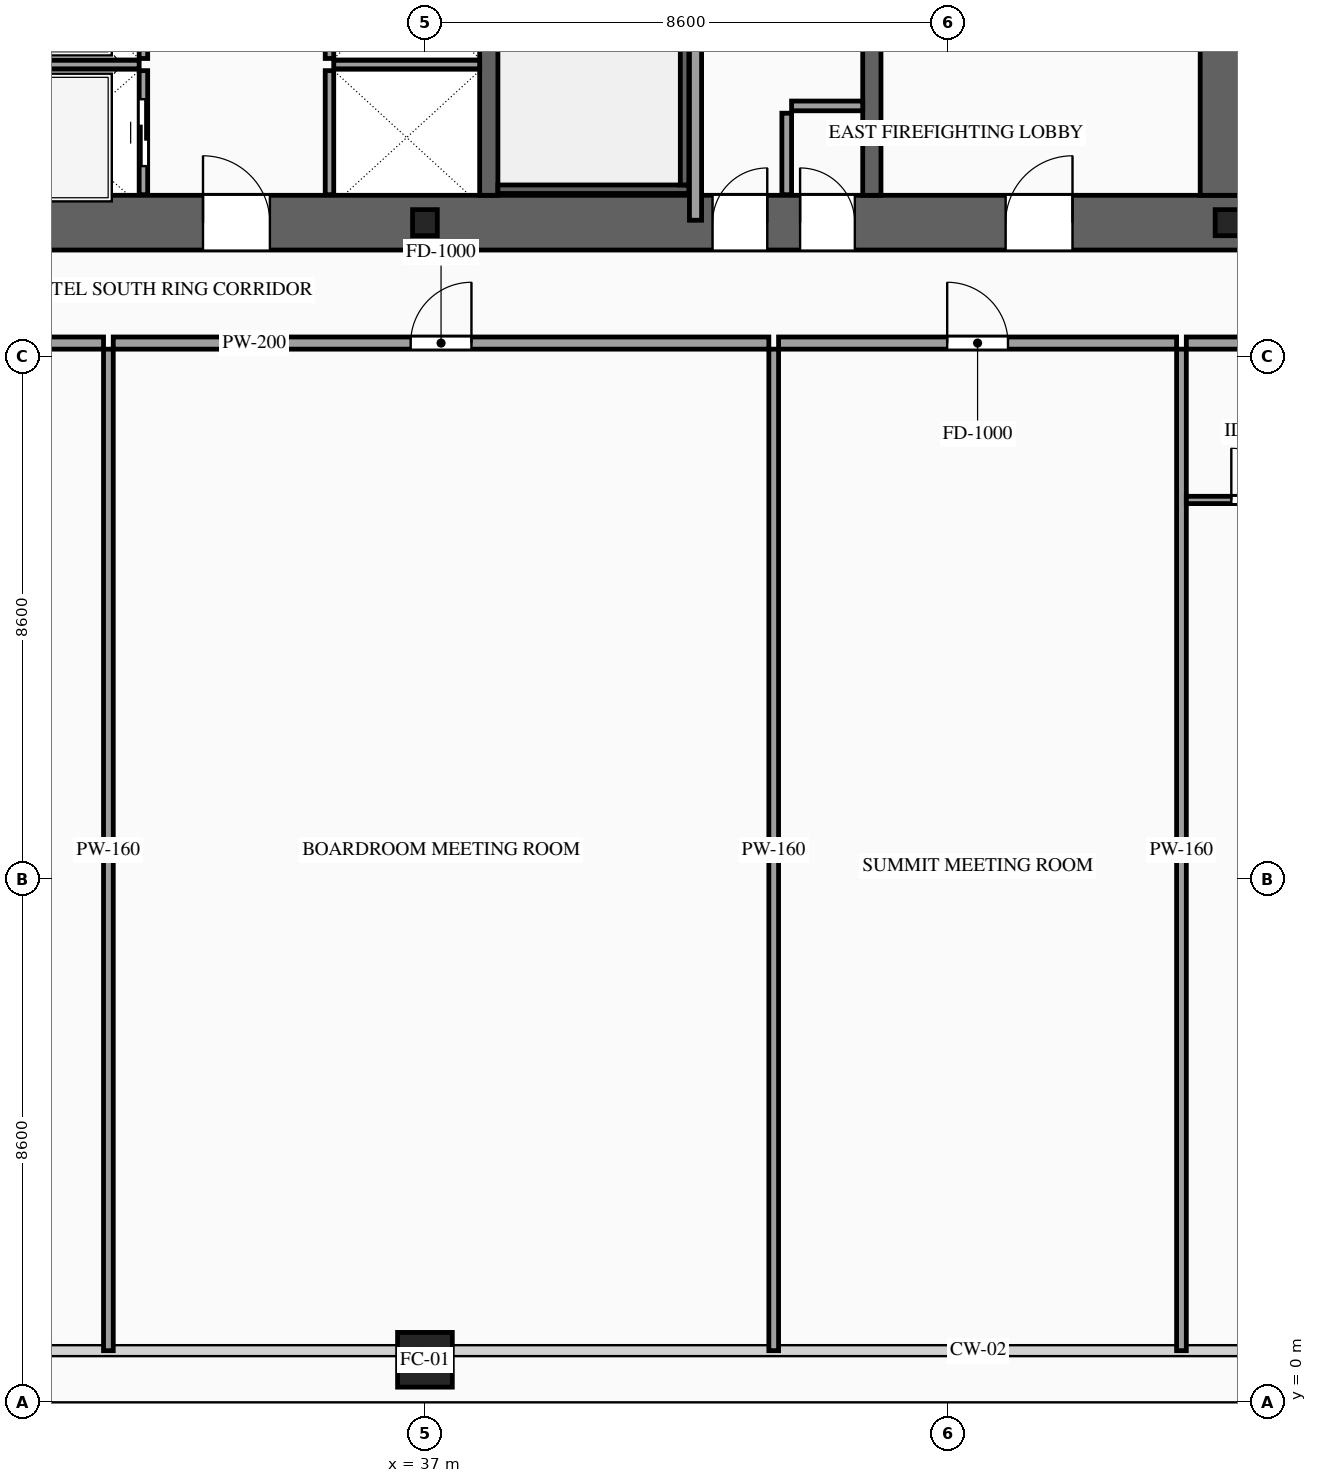
"""IFC4 building model, lengths in metres.
Left out: names, types, materials, properties, quantities, classifications, styles, units other than length and angle.
Written with IfcOpenShell. Run it as: python <this file> out.ifc"""

import sys

from ifc_helpers import new_model, si_unit, direction, frame, frame_2d, origin, origin_2d, place, context, subcontext, project, spatial, rectangle, hollow_rectangle, i_section, extrude, source, transform, mapped, element, fill, save


model = new_model("IFC4")
c1 = context("Model", 3, precision=1e-05, world=origin(), true_north=direction((0.0, 1.0)))
c2 = subcontext(c1, "Body", "Model", "MODEL_VIEW")
j1 = project(units=[si_unit("LENGTHUNIT", "METRE"), si_unit("PLANEANGLEUNIT", "RADIAN")], contexts=[c1])
p1 = place(None, origin())
s1 = spatial("IfcSite", under=j1, at=p1, CompositionType="ELEMENT")
p2 = place(p1, origin())
s2 = spatial("IfcBuilding", under=s1, at=p2, CompositionType="ELEMENT")
p3 = place(p2, frame((0.0, 0.0, 46.0)))
s3 = spatial("IfcBuildingStorey", under=s2, at=p3, CompositionType="ELEMENT", Elevation=46.0)
p4 = place(p3, frame((23.35, 19.4, 0.0), z_axis=(0.0, 0.0, 1.0), x_axis=(1.0, 0.0, 0.0)))
e1 = element("IfcWall", 1, at=p4, inside=s3, PredefinedType="SHEAR", context=c2, shape_type="SweptSolid", body=[
    extrude(rectangle(XDim=27.3, YDim=0.9, at=frame_2d((13.65, 0.0))), origin(), (0.0, 0.0, 1.0), 3.6),
])
p5 = place(p4, frame((2.1, 0.0, 0.0)))
e2 = element("IfcOpeningElement", 2, at=p5, cuts=e1, PredefinedType="OPENING", context=c2, shape_type="SweptSolid", body=[
    extrude(rectangle(XDim=1.1, YDim=2.2, at=frame_2d((0.55, 1.1))), frame((0.0, 0.465, 0.0), z_axis=(0.0, -1.0, 0.0), x_axis=(1.0, 0.0, 0.0)), (0.0, 0.0, 1.0), 0.93),
])
p6 = place(p4, frame((10.0, 0.0, 0.0)))
e3 = element("IfcOpeningElement", 3, at=p6, cuts=e1, PredefinedType="OPENING", context=c2, shape_type="SweptSolid", body=[
    extrude(rectangle(XDim=1.1, YDim=2.2, at=frame_2d((0.55, 1.1))), frame((0.0, 0.465, 0.0), z_axis=(0.0, -1.0, 0.0), x_axis=(1.0, 0.0, 0.0)), (0.0, 0.0, 1.0), 0.93),
])
p7 = place(p4, frame((23.2, 0.0, 0.0)))
e4 = element("IfcOpeningElement", 4, at=p7, cuts=e1, PredefinedType="OPENING", context=c2, shape_type="SweptSolid", body=[
    extrude(rectangle(XDim=1.1, YDim=2.2, at=frame_2d((0.55, 1.1))), frame((0.0, 0.465, 0.0), z_axis=(0.0, -1.0, 0.0), x_axis=(1.0, 0.0, 0.0)), (0.0, 0.0, 1.0), 0.93),
])
p8 = place(p4, frame((19.82, 0.0, 0.0)))
e5 = element("IfcOpeningElement", 5, at=p8, cuts=e1, PredefinedType="OPENING", context=c2, shape_type="SweptSolid", body=[
    extrude(rectangle(XDim=0.9, YDim=2.15, at=frame_2d((0.45, 1.075))), frame((0.0, 0.465, 0.0), z_axis=(0.0, -1.0, 0.0), x_axis=(1.0, 0.0, 0.0)), (0.0, 0.0, 1.0), 0.93),
])
p9 = place(p4, frame((18.38, 0.0, 0.0)))
e6 = element("IfcOpeningElement", 6, at=p9, cuts=e1, PredefinedType="OPENING", context=c2, shape_type="SweptSolid", body=[
    extrude(rectangle(XDim=0.9, YDim=2.15, at=frame_2d((0.45, 1.075))), frame((0.0, 0.465, 0.0), z_axis=(0.0, -1.0, 0.0), x_axis=(1.0, 0.0, 0.0)), (0.0, 0.0, 1.0), 0.93),
])
m1 = source(origin(), c2, "Body", "SweptSolid", [
    extrude(rectangle(XDim=11.9, YDim=0.9, at=frame_2d((5.95, 0.0))), origin(), (0.0, 0.0, 1.0), 3.6),
])
p10 = place(p3, frame((50.2, 19.85, 0.0), z_axis=(0.0, 0.0, 1.0), x_axis=(0.0, 1.0, 0.0)))
e7 = element("IfcWall", 7, at=p10, inside=s3, PredefinedType="SHEAR", context=c2, shape_type="MappedRepresentation", body=[
    mapped(m1, transform((0.0, 0.0, 0.0), scale=1.0)),
])
m2 = source(origin(), c2, "Body", "SweptSolid", [
    extrude(rectangle(XDim=11.9, YDim=0.3, at=frame_2d((5.95, 0.0))), origin(), (0.0, 0.0, 1.0), 3.6),
])
for number, where, z_axis, x_axis in (
    (8, (38.05, 19.85, 0.0), (0.0, 0.0, 1.0), (0.0, 1.0, 0.0)),
    (9, (44.35, 19.85, 0.0), (0.0, 0.0, 1.0), (0.0, 1.0, 0.0)),
):
    element("IfcWall", number, at=place(p3, frame(where, z_axis=z_axis, x_axis=x_axis)), inside=s3, PredefinedType="SOLIDWALL", context=c2, shape_type="MappedRepresentation", body=[
        mapped(m2, transform((0.0, 0.0, 0.0), scale=1.0)),
    ])
m3 = source(origin(), c2, "Body", "SweptSolid", [
    extrude(i_section(OverallWidth=0.407, OverallDepth=0.428, WebThickness=0.02, FlangeThickness=0.035, at=origin_2d()), origin(), (0.0, 0.0, 1.0), 3.6),
])
for number, where, z_axis, x_axis in (
    (10, (37.0, 19.4, 0.0), (0.0, 0.0, 1.0), (1.0, 0.0, 0.0)),
    (11, (50.2, 19.4, 0.0), (0.0, 0.0, 1.0), (1.0, 0.0, 0.0)),
):
    element("IfcColumn", number, at=place(p3, frame(where, z_axis=z_axis, x_axis=x_axis)), inside=s3, PredefinedType="COLUMN", context=c2, shape_type="MappedRepresentation", body=[
        mapped(m3, transform((0.0, 0.0, 0.0), scale=1.0)),
    ])
m4 = source(origin(), c2, "Body", "SweptSolid", [
    extrude(hollow_rectangle(XDim=0.9, YDim=0.9, WallThickness=0.042, at=origin_2d()), origin(), (0.0, 0.0, 1.0), 3.6),
])
p11 = place(p3, frame((37.0, 0.7, 0.0), z_axis=(0.0, 0.0, 1.0), x_axis=(1.0, 0.0, 0.0)))
e12 = element("IfcColumn", 12, at=p11, inside=s3, PredefinedType="COLUMN", context=c2, shape_type="MappedRepresentation", body=[
    mapped(m4, transform((0.0, 0.0, 0.0), scale=1.0)),
])
p12 = place(p3, frame((32.37, 19.86, 0.0), z_axis=(0.0, 0.0, 1.0), x_axis=(0.0, 1.0, 0.0)))
e13 = element("IfcWall", 13, at=p12, inside=s3, PredefinedType="SOLIDWALL", context=c2, shape_type="SweptSolid", body=[
    extrude(rectangle(XDim=2.04, YDim=0.14, at=frame_2d((1.02, 0.0))), origin(), (0.0, 0.0, 1.0), 3.38),
])
p13 = place(p12, frame((0.47, 0.0, 0.0)))
e14 = element("IfcOpeningElement", 14, at=p13, cuts=e13, PredefinedType="OPENING", context=c2, shape_type="SweptSolid", body=[
    extrude(rectangle(XDim=1.1, YDim=2.2, at=frame_2d((0.55, 1.1))), frame((0.0, 0.085, 0.0), z_axis=(0.0, -1.0, 0.0), x_axis=(1.0, 0.0, 0.0)), (0.0, 0.0, 1.0), 0.17),
])
m5 = source(origin(), c2, "Body", "SweptSolid", [
    extrude(rectangle(XDim=2.5, YDim=0.14, at=frame_2d((1.25, 0.0))), origin(), (0.0, 0.0, 1.0), 3.38),
])
p14 = place(p3, frame((29.8, 22.0, 0.0), z_axis=(0.0, 0.0, 1.0), x_axis=(1.0, 0.0, 0.0)))
e15 = element("IfcWall", 15, at=p14, inside=s3, PredefinedType="SOLIDWALL", context=c2, shape_type="MappedRepresentation", body=[
    mapped(m5, transform((0.0, 0.0, 0.0), scale=1.0)),
])
p15 = place(p3, frame((32.37, 22.1, 0.0), z_axis=(0.0, 0.0, 1.0), x_axis=(0.0, 1.0, 0.0)))
e16 = element("IfcWall", 16, at=p15, inside=s3, PredefinedType="SOLIDWALL", context=c2, shape_type="SweptSolid", body=[
    extrude(rectangle(XDim=2.2, YDim=0.14, at=frame_2d((1.1, 0.0))), origin(), (0.0, 0.0, 1.0), 3.38),
])
p16 = place(p15, frame((0.55, 0.0, 0.0)))
e17 = element("IfcOpeningElement", 17, at=p16, cuts=e16, PredefinedType="OPENING", context=c2, shape_type="SweptSolid", body=[
    extrude(rectangle(XDim=1.1, YDim=2.2, at=frame_2d((0.55, 1.1))), frame((0.0, 0.085, 0.0), z_axis=(0.0, -1.0, 0.0), x_axis=(1.0, 0.0, 0.0)), (0.0, 0.0, 1.0), 0.17),
])
m6 = source(origin(), c2, "Body", "SweptSolid", [
    extrude(rectangle(XDim=2.04, YDim=0.14, at=frame_2d((1.02, 0.0))), origin(), (0.0, 0.0, 1.0), 3.38),
])
p17 = place(p3, frame((35.43, 19.86, 0.0), z_axis=(0.0, 0.0, 1.0), x_axis=(0.0, 1.0, 0.0)))
e18 = element("IfcWall", 18, at=p17, inside=s3, PredefinedType="SOLIDWALL", context=c2, shape_type="MappedRepresentation", body=[
    mapped(m6, transform((0.0, 0.0, 0.0), scale=1.0)),
])
m7 = source(origin(), c2, "Body", "SweptSolid", [
    extrude(rectangle(XDim=2.4, YDim=0.14, at=frame_2d((1.2, 0.0))), origin(), (0.0, 0.0, 1.0), 3.38),
])
p18 = place(p3, frame((35.5, 22.0, 0.0), z_axis=(0.0, 0.0, 1.0), x_axis=(1.0, 0.0, 0.0)))
e19 = element("IfcWall", 19, at=p18, inside=s3, PredefinedType="SOLIDWALL", context=c2, shape_type="MappedRepresentation", body=[
    mapped(m7, transform((0.0, 0.0, 0.0), scale=1.0)),
])
m8 = source(origin(), c2, "Body", "SweptSolid", [
    extrude(rectangle(XDim=2.2, YDim=0.14, at=frame_2d((1.1, 0.0))), origin(), (0.0, 0.0, 1.0), 3.38),
])
p19 = place(p3, frame((35.43, 22.1, 0.0), z_axis=(0.0, 0.0, 1.0), x_axis=(0.0, 1.0, 0.0)))
e20 = element("IfcWall", 20, at=p19, inside=s3, PredefinedType="SOLIDWALL", context=c2, shape_type="MappedRepresentation", body=[
    mapped(m8, transform((0.0, 0.0, 0.0), scale=1.0)),
])
m9 = source(origin(), c2, "Body", "SweptSolid", [
    extrude(rectangle(XDim=3.14, YDim=0.14, at=frame_2d((1.57, 0.0))), origin(), (0.0, 0.0, 1.0), 3.38),
])
p20 = place(p3, frame((38.2, 19.95, 0.0), z_axis=(0.0, 0.0, 1.0), x_axis=(1.0, 0.0, 0.0)))
e21 = element("IfcWall", 21, at=p20, inside=s3, PredefinedType="SOLIDWALL", context=c2, shape_type="MappedRepresentation", body=[
    mapped(m9, transform((0.0, 0.0, 0.0), scale=1.0)),
])
m10 = source(origin(), c2, "Body", "SweptSolid", [
    extrude(rectangle(XDim=8.94, YDim=0.14, at=frame_2d((4.47, 0.0))), origin(), (0.0, 0.0, 1.0), 3.38),
])
p21 = place(p3, frame((41.27, 20.02, 0.0), z_axis=(0.0, 0.0, 1.0), x_axis=(0.0, 1.0, 0.0)))
e22 = element("IfcWall", 22, at=p21, inside=s3, PredefinedType="SOLIDWALL", context=c2, shape_type="MappedRepresentation", body=[
    mapped(m10, transform((0.0, 0.0, 0.0), scale=1.0)),
])
m11 = source(origin(), c2, "Body", "SweptSolid", [
    extrude(rectangle(XDim=1.34, YDim=0.16, at=frame_2d((0.67, 0.0))), origin(), (0.0, 0.0, 1.0), 3.38),
])
p22 = place(p3, frame((42.95, 19.86, 0.0), z_axis=(0.0, 0.0, 1.0), x_axis=(0.0, 1.0, 0.0)))
e23 = element("IfcWall", 23, at=p22, inside=s3, PredefinedType="PARTITIONING", context=c2, shape_type="MappedRepresentation", body=[
    mapped(m11, transform((0.0, 0.0, 0.0), scale=1.0)),
])
m12 = source(origin(), c2, "Body", "SweptSolid", [
    extrude(rectangle(XDim=1.17, YDim=0.16, at=frame_2d((0.585, 0.0))), origin(), (0.0, 0.0, 1.0), 3.38),
])
p23 = place(p3, frame((43.03, 21.32, 0.0), z_axis=(0.0, 0.0, 1.0), x_axis=(1.0, 0.0, 0.0)))
e24 = element("IfcWall", 24, at=p23, inside=s3, PredefinedType="PARTITIONING", context=c2, shape_type="MappedRepresentation", body=[
    mapped(m12, transform((0.0, 0.0, 0.0), scale=1.0)),
])
m13 = source(origin(), c2, "Body", "SweptSolid", [
    extrude(rectangle(XDim=6.51, YDim=0.2, at=frame_2d((3.255, 0.0))), origin(), (0.0, 0.0, 1.0), 3.38),
])
p24 = place(p3, frame((41.45, 19.44, 0.0), z_axis=(0.0, 0.0, 1.0), x_axis=(0.0, 1.0, 0.0)))
e25 = element("IfcWall", 25, at=p24, inside=s3, PredefinedType="PARTITIONING", context=c2, shape_type="MappedRepresentation", body=[
    mapped(m13, transform((0.0, 0.0, 0.0), scale=1.0)),
])
p25 = place(p3, frame((25.168, 17.42, 0.0), z_axis=(0.0, 0.0, 1.0), x_axis=(1.0, 0.0, 0.0)))
e26 = element("IfcWall", 26, at=p25, inside=s3, PredefinedType="PARTITIONING", context=c2, shape_type="SweptSolid", body=[
    extrude(rectangle(XDim=6.546, YDim=0.2, at=frame_2d((3.273, 0.0))), origin(), (0.0, 0.0, 1.0), 3.38),
])
p26 = place(p25, frame((3.978, 0.0, 0.0)))
e27 = element("IfcOpeningElement", 27, at=p26, cuts=e26, PredefinedType="OPENING", context=c2, shape_type="SweptSolid", body=[
    extrude(rectangle(XDim=1.0, YDim=2.2, at=frame_2d((0.5, 1.1))), frame((0.0, 0.115, 0.0), z_axis=(0.0, -1.0, 0.0), x_axis=(1.0, 0.0, 0.0)), (0.0, 0.0, 1.0), 0.23),
])
m14 = source(origin(), c2, "Body", "SweptSolid", [
    extrude(rectangle(XDim=16.47, YDim=0.16, at=frame_2d((8.235, 0.0))), origin(), (0.0, 0.0, 1.0), 3.38),
])
p27 = place(p3, frame((31.794, 0.85, 0.0), z_axis=(0.0, 0.0, 1.0), x_axis=(0.0, 1.0, 0.0)))
e28 = element("IfcWall", 28, at=p27, inside=s3, PredefinedType="PARTITIONING", context=c2, shape_type="MappedRepresentation", body=[
    mapped(m14, transform((0.0, 0.0, 0.0), scale=1.0)),
])
p28 = place(p3, frame((31.874, 17.42, 0.0), z_axis=(0.0, 0.0, 1.0), x_axis=(1.0, 0.0, 0.0)))
e29 = element("IfcWall", 29, at=p28, inside=s3, PredefinedType="PARTITIONING", context=c2, shape_type="SweptSolid", body=[
    extrude(rectangle(XDim=10.782, YDim=0.2, at=frame_2d((5.391, 0.0))), origin(), (0.0, 0.0, 1.0), 3.38),
])
p29 = place(p28, frame((4.891, 0.0, 0.0)))
e30 = element("IfcOpeningElement", 30, at=p29, cuts=e29, PredefinedType="OPENING", context=c2, shape_type="SweptSolid", body=[
    extrude(rectangle(XDim=1.0, YDim=2.2, at=frame_2d((0.5, 1.1))), frame((0.0, 0.115, 0.0), z_axis=(0.0, -1.0, 0.0), x_axis=(1.0, 0.0, 0.0)), (0.0, 0.0, 1.0), 0.23),
])
p30 = place(p3, frame((42.736, 0.85, 0.0), z_axis=(0.0, 0.0, 1.0), x_axis=(0.0, 1.0, 0.0)))
e31 = element("IfcWall", 31, at=p30, inside=s3, PredefinedType="PARTITIONING", context=c2, shape_type="MappedRepresentation", body=[
    mapped(m14, transform((0.0, 0.0, 0.0), scale=1.0)),
])
p31 = place(p3, frame((42.816, 17.42, 0.0), z_axis=(0.0, 0.0, 1.0), x_axis=(1.0, 0.0, 0.0)))
e32 = element("IfcWall", 32, at=p31, inside=s3, PredefinedType="PARTITIONING", context=c2, shape_type="SweptSolid", body=[
    extrude(rectangle(XDim=6.546, YDim=0.2, at=frame_2d((3.273, 0.0))), origin(), (0.0, 0.0, 1.0), 3.38),
])
p32 = place(p31, frame((2.773, 0.0, 0.0)))
e33 = element("IfcOpeningElement", 33, at=p32, cuts=e32, PredefinedType="OPENING", context=c2, shape_type="SweptSolid", body=[
    extrude(rectangle(XDim=1.0, YDim=2.2, at=frame_2d((0.5, 1.1))), frame((0.0, 0.115, 0.0), z_axis=(0.0, -1.0, 0.0), x_axis=(1.0, 0.0, 0.0)), (0.0, 0.0, 1.0), 0.23),
])
p33 = place(p3, frame((49.442, 0.85, 0.0), z_axis=(0.0, 0.0, 1.0), x_axis=(0.0, 1.0, 0.0)))
e34 = element("IfcWall", 34, at=p33, inside=s3, PredefinedType="PARTITIONING", context=c2, shape_type="MappedRepresentation", body=[
    mapped(m14, transform((0.0, 0.0, 0.0), scale=1.0)),
])
p34 = place(p3, frame((49.522, 17.42, 0.0), z_axis=(0.0, 0.0, 1.0), x_axis=(1.0, 0.0, 0.0)))
e35 = element("IfcWall", 35, at=p34, inside=s3, PredefinedType="PARTITIONING", context=c2, shape_type="SweptSolid", body=[
    extrude(rectangle(XDim=9.538, YDim=0.2, at=frame_2d((4.769, 0.0))), origin(), (0.0, 0.0, 1.0), 3.38),
])
p35 = place(p34, frame((5.474, 0.0, 0.0)))
e36 = element("IfcOpeningElement", 36, at=p35, cuts=e35, PredefinedType="OPENING", context=c2, shape_type="SweptSolid", body=[
    extrude(rectangle(XDim=1.0, YDim=2.2, at=frame_2d((0.5, 1.1))), frame((0.0, 0.115, 0.0), z_axis=(0.0, -1.0, 0.0), x_axis=(1.0, 0.0, 0.0)), (0.0, 0.0, 1.0), 0.23),
])
p36 = place(p3, frame((49.522, 14.84, 0.0), z_axis=(0.0, 0.0, 1.0), x_axis=(1.0, 0.0, 0.0)))
e37 = element("IfcWall", 37, at=p36, inside=s3, PredefinedType="PARTITIONING", context=c2, shape_type="SweptSolid", body=[
    extrude(rectangle(XDim=2.33, YDim=0.12, at=frame_2d((1.165, 0.0))), origin(), (0.0, 0.0, 1.0), 3.38),
])
p37 = place(p36, frame((0.74, 0.0, 0.0)))
e38 = element("IfcOpeningElement", 38, at=p37, cuts=e37, PredefinedType="OPENING", context=c2, shape_type="SweptSolid", body=[
    extrude(rectangle(XDim=0.85, YDim=2.1, at=frame_2d((0.425, 1.05))), frame((0.0, 0.075, 0.0), z_axis=(0.0, -1.0, 0.0), x_axis=(1.0, 0.0, 0.0)), (0.0, 0.0, 1.0), 0.15),
])
m15 = source(origin(), c2, "Body", "SweptSolid", [
    extrude(rectangle(XDim=1.1, YDim=2.2, at=frame_2d((0.55, 1.1))), frame((0.0, 0.025, 0.0), z_axis=(0.0, -1.0, 0.0), x_axis=(1.0, 0.0, 0.0)), (0.0, 0.0, 1.0), 0.05),
])
p38 = place(p13, origin())
e39 = element("IfcDoor", 39, at=p38, inside=s3, OperationType="SLIDING_TO_LEFT", PredefinedType="DOOR", context=c2, shape_type="MappedRepresentation", body=[
    mapped(m15, transform((0.0, 0.0, 0.0), scale=1.0)),
])
fill(e14, e39)
m16 = source(origin(), c2, "Body", "SweptSolid", [
    extrude(rectangle(XDim=1.1, YDim=2.2, at=frame_2d((0.55, 1.1))), frame((0.0, 0.025, 0.0), z_axis=(0.0, -1.0, 0.0), x_axis=(1.0, 0.0, 0.0)), (0.0, 0.0, 1.0), 0.05),
])
p39 = place(p6, origin())
e40 = element("IfcDoor", 40, at=p39, inside=s3, OperationType="SINGLE_SWING_LEFT", PredefinedType="DOOR", context=c2, shape_type="MappedRepresentation", body=[
    mapped(m16, transform((0.0, 0.0, 0.0), scale=1.0)),
])
fill(e3, e40)
p40 = place(p7, origin())
e41 = element("IfcDoor", 41, at=p40, inside=s3, OperationType="SINGLE_SWING_RIGHT", PredefinedType="DOOR", context=c2, shape_type="MappedRepresentation", body=[
    mapped(m16, transform((0.0, 0.0, 0.0), scale=1.0)),
])
fill(e4, e41)
m17 = source(origin(), c2, "Body", "SweptSolid", [
    extrude(rectangle(XDim=0.9, YDim=2.15, at=frame_2d((0.45, 1.075))), frame((0.0, 0.025, 0.0), z_axis=(0.0, -1.0, 0.0), x_axis=(1.0, 0.0, 0.0)), (0.0, 0.0, 1.0), 0.05),
])
p41 = place(p8, origin())
e42 = element("IfcDoor", 42, at=p41, inside=s3, OperationType="SINGLE_SWING_LEFT", PredefinedType="DOOR", context=c2, shape_type="MappedRepresentation", body=[
    mapped(m17, transform((0.0, 0.0, 0.0), scale=1.0)),
])
fill(e5, e42)
p42 = place(p9, origin())
e43 = element("IfcDoor", 43, at=p42, inside=s3, OperationType="SINGLE_SWING_RIGHT", PredefinedType="DOOR", context=c2, shape_type="MappedRepresentation", body=[
    mapped(m17, transform((0.0, 0.0, 0.0), scale=1.0)),
])
fill(e6, e43)
m18 = source(origin(), c2, "Body", "SweptSolid", [
    extrude(rectangle(XDim=1.0, YDim=2.2, at=frame_2d((0.5, 1.1))), frame((0.0, 0.025, 0.0), z_axis=(0.0, -1.0, 0.0), x_axis=(1.0, 0.0, 0.0)), (0.0, 0.0, 1.0), 0.05),
])
p43 = place(p29, origin())
e44 = element("IfcDoor", 44, at=p43, inside=s3, OperationType="SINGLE_SWING_RIGHT", PredefinedType="DOOR", context=c2, shape_type="MappedRepresentation", body=[
    mapped(m18, transform((0.0, 0.0, 0.0), scale=1.0)),
])
fill(e30, e44)
p44 = place(p32, origin())
e45 = element("IfcDoor", 45, at=p44, inside=s3, OperationType="SINGLE_SWING_LEFT", PredefinedType="DOOR", context=c2, shape_type="MappedRepresentation", body=[
    mapped(m18, transform((0.0, 0.0, 0.0), scale=1.0)),
])
fill(e33, e45)
m19 = source(origin(), c2, "Body", "SweptSolid", [
    extrude(rectangle(XDim=0.85, YDim=2.1, at=frame_2d((0.425, 1.05))), frame((0.0, 0.025, 0.0), z_axis=(0.0, -1.0, 0.0), x_axis=(1.0, 0.0, 0.0)), (0.0, 0.0, 1.0), 0.05),
])
p45 = place(p37, origin())
e46 = element("IfcDoor", 46, at=p45, inside=s3, OperationType="SINGLE_SWING_LEFT", PredefinedType="DOOR", context=c2, shape_type="MappedRepresentation", body=[
    mapped(m19, transform((0.0, 0.0, 0.0), scale=1.0)),
])
fill(e38, e46)
save(model, sys.argv[1])
